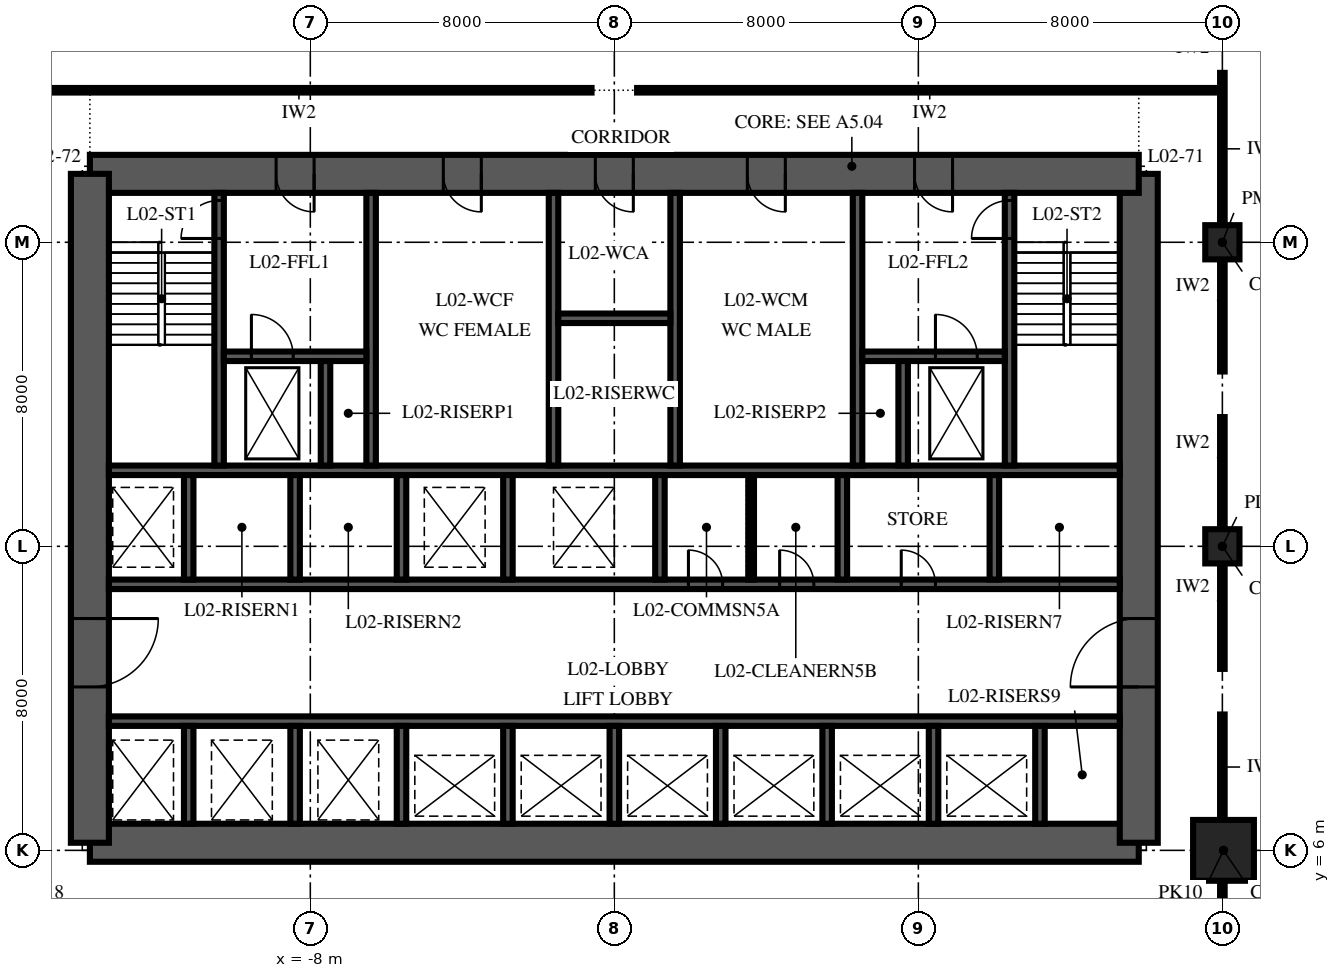
"""IFC4 building model, lengths in metres.
Left out: names, types, materials, properties, quantities, classifications, styles, units other than length and angle.
Written with IfcOpenShell. Run it as: python <this file> out.ifc"""

import sys

from ifc_helpers import new_model, si_unit, direction, frame, frame_2d, origin, origin_2d, place, context, subcontext, project, spatial, polyline, rectangle, outline, extrude, element, fill, save


model = new_model("IFC4")
c1 = context("Model", 3, precision=1e-05, world=origin(), true_north=direction((0.0, 1.0)))
c2 = subcontext(c1, "Body", "Model", "MODEL_VIEW")
j1 = project(units=[si_unit("LENGTHUNIT", "METRE"), si_unit("PLANEANGLEUNIT", "RADIAN")], contexts=[c1])
p1 = place(None, origin())
s1 = spatial("IfcSite", under=j1, at=p1, CompositionType="ELEMENT")
p2 = place(p1, origin())
s2 = spatial("IfcBuilding", under=s1, at=p2, CompositionType="ELEMENT")
p3 = place(p2, frame((0.0, 0.0, 12.0)))
s3 = spatial("IfcBuildingStorey", under=s2, at=p3, CompositionType="ELEMENT", Elevation=12.0)
p4 = place(p3, frame((16.03, 6.0, 0.0), z_axis=(0.0, 0.0, 1.0), x_axis=(1.0, 0.0, 0.0)))
e1 = element("IfcColumn", 1, at=p4, inside=s3, PredefinedType="COLUMN", context=c2, shape_type="SweptSolid", body=[
    extrude(rectangle(XDim=1.6, YDim=1.6, at=origin_2d()), origin(), (0.0, 0.0, 1.0), 7.0),
])
for number, where, z_axis, x_axis in (
    (2, (16.0, 14.0, 0.0), (0.0, 0.0, 1.0), (1.0, 0.0, 0.0)),
    (3, (16.0, 22.0, 0.0), (0.0, 0.0, 1.0), (1.0, 0.0, 0.0)),
):
    element("IfcColumn", number, at=place(p3, frame(where, z_axis=z_axis, x_axis=x_axis)), inside=s3, PredefinedType="COLUMN", context=c2, shape_type="SweptSolid", body=[
        extrude(rectangle(XDim=0.9, YDim=0.9, at=origin_2d()), origin(), (0.0, 0.0, 1.0), 7.0),
    ])
p5 = place(p3, frame((-13.8, 6.2, 0.0), z_axis=(0.0, 0.0, 1.0), x_axis=(1.0, 0.0, 0.0)))
e4 = element("IfcWall", 4, at=p5, inside=s3, PredefinedType="SHEAR", context=c2, shape_type="SweptSolid", body=[
    extrude(rectangle(XDim=27.6, YDim=1.0, at=frame_2d((13.8, 0.0))), origin(), (0.0, 0.0, 1.0), 7.0),
])
p6 = place(p3, frame((13.8, 6.2, 0.0), z_axis=(0.0, 0.0, 1.0), x_axis=(0.0, 1.0, 0.0)))
e5 = element("IfcWall", 5, at=p6, inside=s3, PredefinedType="SHEAR", context=c2, shape_type="SweptSolid", body=[
    extrude(outline(polyline([(0.0, -0.5), (17.6, -0.5), (17.6, 0.0), (17.1, 0.0), (17.1, 0.5), (0.5, 0.5), (0.5, 0.0), (0.0, 0.0), (0.0, -0.5)])), origin(), (0.0, 0.0, 1.0), 7.0),
])
p7 = place(p6, frame((4.1, 0.0, 0.0)))
e6 = element("IfcOpeningElement", 6, at=p7, cuts=e5, PredefinedType="OPENING", context=c2, shape_type="SweptSolid", body=[
    extrude(rectangle(XDim=1.8, YDim=2.4, at=frame_2d((0.9, 1.2))), frame((0.0, 0.515, 0.0), z_axis=(0.0, -1.0, 0.0), x_axis=(1.0, 0.0, 0.0)), (0.0, 0.0, 1.0), 1.03),
])
p8 = place(p3, frame((13.8, 23.8, 0.0), z_axis=(0.0, 0.0, 1.0), x_axis=(-1.0, 0.0, 0.0)))
e7 = element("IfcWall", 7, at=p8, inside=s3, PredefinedType="SHEAR", context=c2, shape_type="SweptSolid", body=[
    extrude(rectangle(XDim=27.6, YDim=1.0, at=frame_2d((13.8, 0.0))), origin(), (0.0, 0.0, 1.0), 7.0),
])
p9 = place(p8, frame((21.7, 0.0, 0.0)))
e8 = element("IfcOpeningElement", 8, at=p9, cuts=e7, PredefinedType="OPENING", context=c2, shape_type="SweptSolid", body=[
    extrude(rectangle(XDim=1.0, YDim=2.1, at=frame_2d((0.5, 1.05))), frame((0.0, 0.515, 0.0), z_axis=(0.0, -1.0, 0.0), x_axis=(1.0, 0.0, 0.0)), (0.0, 0.0, 1.0), 1.03),
])
p10 = place(p8, frame((4.9, 0.0, 0.0)))
e9 = element("IfcOpeningElement", 9, at=p10, cuts=e7, PredefinedType="OPENING", context=c2, shape_type="SweptSolid", body=[
    extrude(rectangle(XDim=1.0, YDim=2.1, at=frame_2d((0.5, 1.05))), frame((0.0, 0.515, 0.0), z_axis=(0.0, -1.0, 0.0), x_axis=(1.0, 0.0, 0.0)), (0.0, 0.0, 1.0), 1.03),
])
p11 = place(p8, frame((17.3, 0.0, 0.0)))
e10 = element("IfcOpeningElement", 10, at=p11, cuts=e7, PredefinedType="OPENING", context=c2, shape_type="SweptSolid", body=[
    extrude(rectangle(XDim=1.0, YDim=2.1, at=frame_2d((0.5, 1.05))), frame((0.0, 0.515, 0.0), z_axis=(0.0, -1.0, 0.0), x_axis=(1.0, 0.0, 0.0)), (0.0, 0.0, 1.0), 1.03),
])
p12 = place(p8, frame((13.3, 0.0, 0.0)))
e11 = element("IfcOpeningElement", 11, at=p12, cuts=e7, PredefinedType="OPENING", context=c2, shape_type="SweptSolid", body=[
    extrude(rectangle(XDim=1.0, YDim=2.1, at=frame_2d((0.5, 1.05))), frame((0.0, 0.515, 0.0), z_axis=(0.0, -1.0, 0.0), x_axis=(1.0, 0.0, 0.0)), (0.0, 0.0, 1.0), 1.03),
])
p13 = place(p8, frame((9.3, 0.0, 0.0)))
e12 = element("IfcOpeningElement", 12, at=p13, cuts=e7, PredefinedType="OPENING", context=c2, shape_type="SweptSolid", body=[
    extrude(rectangle(XDim=1.0, YDim=2.1, at=frame_2d((0.5, 1.05))), frame((0.0, 0.515, 0.0), z_axis=(0.0, -1.0, 0.0), x_axis=(1.0, 0.0, 0.0)), (0.0, 0.0, 1.0), 1.03),
])
p14 = place(p3, frame((-13.8, 23.8, 0.0), z_axis=(0.0, 0.0, 1.0), x_axis=(0.0, -1.0, 0.0)))
e13 = element("IfcWall", 13, at=p14, inside=s3, PredefinedType="SHEAR", context=c2, shape_type="SweptSolid", body=[
    extrude(outline(polyline([(0.0, -0.5), (17.6, -0.5), (17.6, 0.0), (17.1, 0.0), (17.1, 0.5), (0.5, 0.5), (0.5, 0.0), (0.0, 0.0), (0.0, -0.5)])), origin(), (0.0, 0.0, 1.0), 7.0),
])
p15 = place(p14, frame((11.7, 0.0, 0.0)))
e14 = element("IfcOpeningElement", 14, at=p15, cuts=e13, PredefinedType="OPENING", context=c2, shape_type="SweptSolid", body=[
    extrude(rectangle(XDim=1.8, YDim=2.4, at=frame_2d((0.9, 1.2))), frame((0.0, 0.515, 0.0), z_axis=(0.0, -1.0, 0.0), x_axis=(1.0, 0.0, 0.0)), (0.0, 0.0, 1.0), 1.03),
])
p16 = place(p3, frame((-13.3, 9.4, 0.0), z_axis=(0.0, 0.0, 1.0), x_axis=(1.0, 0.0, 0.0)))
e15 = element("IfcWall", 15, at=p16, inside=s3, PredefinedType="SHEAR", context=c2, shape_type="SweptSolid", body=[
    extrude(rectangle(XDim=26.6, YDim=0.25, at=frame_2d((13.3, 0.0))), origin(), (0.0, 0.0, 1.0), 7.0),
])
p17 = place(p3, frame((-13.3, 13.0, 0.0), z_axis=(0.0, 0.0, 1.0), x_axis=(1.0, 0.0, 0.0)))
e16 = element("IfcWall", 16, at=p17, inside=s3, PredefinedType="SHEAR", context=c2, shape_type="SweptSolid", body=[
    extrude(rectangle(XDim=26.6, YDim=0.25, at=frame_2d((13.3, 0.0))), origin(), (0.0, 0.0, 1.0), 7.0),
])
p18 = place(p17, frame((15.25, 0.0, 0.0)))
e17 = element("IfcOpeningElement", 17, at=p18, cuts=e16, PredefinedType="OPENING", context=c2, shape_type="SweptSolid", body=[
    extrude(rectangle(XDim=0.9, YDim=2.1, at=frame_2d((0.45, 1.05))), frame((0.0, 0.14, 0.0), z_axis=(0.0, -1.0, 0.0), x_axis=(1.0, 0.0, 0.0)), (0.0, 0.0, 1.0), 0.28),
])
p19 = place(p17, frame((17.65, 0.0, 0.0)))
e18 = element("IfcOpeningElement", 18, at=p19, cuts=e16, PredefinedType="OPENING", context=c2, shape_type="SweptSolid", body=[
    extrude(rectangle(XDim=0.9, YDim=2.1, at=frame_2d((0.45, 1.05))), frame((0.0, 0.14, 0.0), z_axis=(0.0, -1.0, 0.0), x_axis=(1.0, 0.0, 0.0)), (0.0, 0.0, 1.0), 0.28),
])
p20 = place(p17, frame((20.85, 0.0, 0.0)))
e19 = element("IfcOpeningElement", 19, at=p20, cuts=e16, PredefinedType="OPENING", context=c2, shape_type="SweptSolid", body=[
    extrude(rectangle(XDim=0.9, YDim=2.1, at=frame_2d((0.45, 1.05))), frame((0.0, 0.14, 0.0), z_axis=(0.0, -1.0, 0.0), x_axis=(1.0, 0.0, 0.0)), (0.0, 0.0, 1.0), 0.28),
])
p21 = place(p3, frame((-13.3, 16.0, 0.0), z_axis=(0.0, 0.0, 1.0), x_axis=(1.0, 0.0, 0.0)))
e20 = element("IfcWall", 20, at=p21, inside=s3, PredefinedType="SHEAR", context=c2, shape_type="SweptSolid", body=[
    extrude(rectangle(XDim=26.6, YDim=0.25, at=frame_2d((13.3, 0.0))), origin(), (0.0, 0.0, 1.0), 7.0),
])
for number, where, z_axis, x_axis in (
    (21, (-11.2, 6.7, 0.0), (0.0, 0.0, 1.0), (0.0, 1.0, 0.0)),
    (22, (-8.4, 6.7, 0.0), (0.0, 0.0, 1.0), (0.0, 1.0, 0.0)),
    (23, (-5.6, 6.7, 0.0), (0.0, 0.0, 1.0), (0.0, 1.0, 0.0)),
    (24, (-2.8, 6.7, 0.0), (0.0, 0.0, 1.0), (0.0, 1.0, 0.0)),
    (25, (0.0, 6.7, 0.0), (0.0, 0.0, 1.0), (0.0, 1.0, 0.0)),
    (26, (2.8, 6.7, 0.0), (0.0, 0.0, 1.0), (0.0, 1.0, 0.0)),
    (27, (5.6, 6.7, 0.0), (0.0, 0.0, 1.0), (0.0, 1.0, 0.0)),
    (28, (8.4, 6.7, 0.0), (0.0, 0.0, 1.0), (0.0, 1.0, 0.0)),
    (29, (11.2, 6.7, 0.0), (0.0, 0.0, 1.0), (0.0, 1.0, 0.0)),
):
    element("IfcWall", number, at=place(p3, frame(where, z_axis=z_axis, x_axis=x_axis)), inside=s3, PredefinedType="SHEAR", context=c2, shape_type="SweptSolid", body=[
        extrude(rectangle(XDim=2.575, YDim=0.25, at=frame_2d((1.288, 0.0))), origin(), (0.0, 0.0, 1.0), 7.0),
    ])
for number, where, z_axis, x_axis in (
    (30, (-11.2, 13.125, 0.0), (0.0, 0.0, 1.0), (0.0, 1.0, 0.0)),
    (31, (-8.4, 13.125, 0.0), (0.0, 0.0, 1.0), (0.0, 1.0, 0.0)),
    (32, (-5.6, 13.125, 0.0), (0.0, 0.0, 1.0), (0.0, 1.0, 0.0)),
    (33, (-2.8, 13.125, 0.0), (0.0, 0.0, 1.0), (0.0, 1.0, 0.0)),
    (34, (1.2, 13.125, 0.0), (0.0, 0.0, 1.0), (0.0, 1.0, 0.0)),
    (35, (6.0, 13.125, 0.0), (0.0, 0.0, 1.0), (0.0, 1.0, 0.0)),
    (36, (10.0, 13.125, 0.0), (0.0, 0.0, 1.0), (0.0, 1.0, 0.0)),
):
    element("IfcWall", number, at=place(p3, frame(where, z_axis=z_axis, x_axis=x_axis)), inside=s3, PredefinedType="SHEAR", context=c2, shape_type="SweptSolid", body=[
        extrude(rectangle(XDim=2.75, YDim=0.25, at=frame_2d((1.375, 0.0))), origin(), (0.0, 0.0, 1.0), 7.0),
    ])
p22 = place(p3, frame((-10.4, 16.125, 0.0), z_axis=(0.0, 0.0, 1.0), x_axis=(0.0, 1.0, 0.0)))
e37 = element("IfcWall", 37, at=p22, inside=s3, PredefinedType="SHEAR", context=c2, shape_type="SweptSolid", body=[
    extrude(rectangle(XDim=7.175, YDim=0.25, at=frame_2d((3.587, 0.0))), origin(), (0.0, 0.0, 1.0), 7.0),
])
p23 = place(p22, frame((5.975, 0.0, 0.0)))
e38 = element("IfcOpeningElement", 38, at=p23, cuts=e37, PredefinedType="OPENING", context=c2, shape_type="SweptSolid", body=[
    extrude(rectangle(XDim=1.0, YDim=2.1, at=frame_2d((0.5, 1.05))), frame((0.0, 0.14, 0.0), z_axis=(0.0, -1.0, 0.0), x_axis=(1.0, 0.0, 0.0)), (0.0, 0.0, 1.0), 0.28),
])
for number, where, z_axis, x_axis in (
    (39, (-6.4, 16.125, 0.0), (0.0, 0.0, 1.0), (0.0, 1.0, 0.0)),
    (40, (-1.6, 16.125, 0.0), (0.0, 0.0, 1.0), (0.0, 1.0, 0.0)),
    (41, (1.6, 16.125, 0.0), (0.0, 0.0, 1.0), (0.0, 1.0, 0.0)),
    (42, (6.4, 16.125, 0.0), (0.0, 0.0, 1.0), (0.0, 1.0, 0.0)),
):
    element("IfcWall", number, at=place(p3, frame(where, z_axis=z_axis, x_axis=x_axis)), inside=s3, PredefinedType="SHEAR", context=c2, shape_type="SweptSolid", body=[
        extrude(rectangle(XDim=7.175, YDim=0.25, at=frame_2d((3.587, 0.0))), origin(), (0.0, 0.0, 1.0), 7.0),
    ])
p24 = place(p3, frame((10.4, 16.125, 0.0), z_axis=(0.0, 0.0, 1.0), x_axis=(0.0, 1.0, 0.0)))
e43 = element("IfcWall", 43, at=p24, inside=s3, PredefinedType="SHEAR", context=c2, shape_type="SweptSolid", body=[
    extrude(rectangle(XDim=7.175, YDim=0.25, at=frame_2d((3.587, 0.0))), origin(), (0.0, 0.0, 1.0), 7.0),
])
p25 = place(p24, frame((5.975, 0.0, 0.0)))
e44 = element("IfcOpeningElement", 44, at=p25, cuts=e43, PredefinedType="OPENING", context=c2, shape_type="SweptSolid", body=[
    extrude(rectangle(XDim=1.0, YDim=2.1, at=frame_2d((0.5, 1.05))), frame((0.0, 0.14, 0.0), z_axis=(0.0, -1.0, 0.0), x_axis=(1.0, 0.0, 0.0)), (0.0, 0.0, 1.0), 0.28),
])
p26 = place(p3, frame((-10.275, 19.0, 0.0), z_axis=(0.0, 0.0, 1.0), x_axis=(1.0, 0.0, 0.0)))
e45 = element("IfcWall", 45, at=p26, inside=s3, PredefinedType="SHEAR", context=c2, shape_type="SweptSolid", body=[
    extrude(rectangle(XDim=3.75, YDim=0.25, at=frame_2d((1.875, 0.0))), origin(), (0.0, 0.0, 1.0), 7.0),
])
p27 = place(p26, frame((0.725, 0.0, 0.0)))
e46 = element("IfcOpeningElement", 46, at=p27, cuts=e45, PredefinedType="OPENING", context=c2, shape_type="SweptSolid", body=[
    extrude(rectangle(XDim=1.1, YDim=2.1, at=frame_2d((0.55, 1.05))), frame((0.0, 0.14, 0.0), z_axis=(0.0, -1.0, 0.0), x_axis=(1.0, 0.0, 0.0)), (0.0, 0.0, 1.0), 0.28),
])
p28 = place(p3, frame((6.525, 19.0, 0.0), z_axis=(0.0, 0.0, 1.0), x_axis=(1.0, 0.0, 0.0)))
e47 = element("IfcWall", 47, at=p28, inside=s3, PredefinedType="SHEAR", context=c2, shape_type="SweptSolid", body=[
    extrude(rectangle(XDim=3.75, YDim=0.25, at=frame_2d((1.875, 0.0))), origin(), (0.0, 0.0, 1.0), 7.0),
])
p29 = place(p28, frame((1.925, 0.0, 0.0)))
e48 = element("IfcOpeningElement", 48, at=p29, cuts=e47, PredefinedType="OPENING", context=c2, shape_type="SweptSolid", body=[
    extrude(rectangle(XDim=1.1, YDim=2.1, at=frame_2d((0.55, 1.05))), frame((0.0, 0.14, 0.0), z_axis=(0.0, -1.0, 0.0), x_axis=(1.0, 0.0, 0.0)), (0.0, 0.0, 1.0), 0.28),
])
for number, where, z_axis, x_axis in (
    (49, (-7.6, 16.125, 0.0), (0.0, 0.0, 1.0), (0.0, 1.0, 0.0)),
    (50, (7.6, 16.125, 0.0), (0.0, 0.0, 1.0), (0.0, 1.0, 0.0)),
):
    element("IfcWall", number, at=place(p3, frame(where, z_axis=z_axis, x_axis=x_axis)), inside=s3, PredefinedType="SHEAR", context=c2, shape_type="SweptSolid", body=[
        extrude(rectangle(XDim=2.75, YDim=0.25, at=frame_2d((1.375, 0.0))), origin(), (0.0, 0.0, 1.0), 7.0),
    ])
p30 = place(p3, frame((-1.475, 20.0, 0.0), z_axis=(0.0, 0.0, 1.0), x_axis=(1.0, 0.0, 0.0)))
e51 = element("IfcWall", 51, at=p30, inside=s3, PredefinedType="SHEAR", context=c2, shape_type="SweptSolid", body=[
    extrude(rectangle(XDim=2.95, YDim=0.25, at=frame_2d((1.475, 0.0))), origin(), (0.0, 0.0, 1.0), 7.0),
])
p31 = place(p3, frame((3.6, 13.125, 0.0), z_axis=(0.0, 0.0, 1.0), x_axis=(0.0, 1.0, 0.0)))
e52 = element("IfcWall", 52, at=p31, inside=s3, PredefinedType="PARTITIONING", context=c2, shape_type="SweptSolid", body=[
    extrude(rectangle(XDim=2.75, YDim=0.15, at=frame_2d((1.375, 0.0))), origin(), (0.0, 0.0, 1.0), 6.85),
])
for number, where, z_axis, x_axis in (
    (53, (16.0, 2.425, 0.0), (0.0, 0.0, 1.0), (0.0, 1.0, 0.0)),
    (54, (16.0, 6.81, 0.0), (0.0, 0.0, 1.0), (0.0, 1.0, 0.0)),
):
    element("IfcWall", number, at=place(p3, frame(where, z_axis=z_axis, x_axis=x_axis)), inside=s3, PredefinedType="PARTITIONING", context=c2, shape_type="SweptSolid", body=[
        extrude(rectangle(XDim=2.765, YDim=0.12, at=frame_2d((1.382, 0.0))), origin(), (0.0, 0.0, 1.0), 6.05),
    ])
p32 = place(p3, frame((16.0, 10.775, 0.0), z_axis=(0.0, 0.0, 1.0), x_axis=(0.0, 1.0, 0.0)))
e55 = element("IfcWall", 55, at=p32, inside=s3, PredefinedType="PARTITIONING", context=c2, shape_type="SweptSolid", body=[
    extrude(rectangle(XDim=2.765, YDim=0.12, at=frame_2d((1.383, 0.0))), origin(), (0.0, 0.0, 1.0), 6.05),
])
for number, where, z_axis, x_axis in (
    (56, (16.0, 14.46, 0.0), (0.0, 0.0, 1.0), (0.0, 1.0, 0.0)),
    (57, (16.0, 18.6, 0.0), (0.0, 0.0, 1.0), (0.0, 1.0, 0.0)),
):
    element("IfcWall", number, at=place(p3, frame(where, z_axis=z_axis, x_axis=x_axis)), inside=s3, PredefinedType="PARTITIONING", context=c2, shape_type="SweptSolid", body=[
        extrude(rectangle(XDim=2.94, YDim=0.12, at=frame_2d((1.47, 0.0))), origin(), (0.0, 0.0, 1.0), 6.05),
    ])
p33 = place(p3, frame((16.0, 22.46, 0.0), z_axis=(0.0, 0.0, 1.0), x_axis=(0.0, 1.0, 0.0)))
e58 = element("IfcWall", 58, at=p33, inside=s3, PredefinedType="PARTITIONING", context=c2, shape_type="SweptSolid", body=[
    extrude(rectangle(XDim=3.998, YDim=0.12, at=frame_2d((1.999, 0.0))), origin(), (0.0, 0.0, 1.0), 6.7),
])
for number, where, z_axis, x_axis in (
    (59, (-16.0, 26.0, 0.0), (0.0, 0.0, 1.0), (1.0, 0.0, 0.0)),
    (60, (0.6, 26.0, 0.0), (0.0, 0.0, 1.0), (1.0, 0.0, 0.0)),
):
    element("IfcWall", number, at=place(p3, frame(where, z_axis=z_axis, x_axis=x_axis)), inside=s3, PredefinedType="PARTITIONING", context=c2, shape_type="SweptSolid", body=[
        extrude(rectangle(XDim=15.4, YDim=0.12, at=frame_2d((7.7, 0.0))), origin(), (0.0, 0.0, 1.0), 6.7),
    ])
p34 = place(p7, origin())
e61 = element("IfcDoor", 61, at=p34, inside=s3, OperationType="DOUBLE_DOOR_SINGLE_SWING", PredefinedType="DOOR", context=c2, shape_type="SweptSolid", body=[
    extrude(rectangle(XDim=1.8, YDim=2.4, at=frame_2d((0.9, 1.2))), frame((0.0, 0.5, 0.0), z_axis=(0.0, -1.0, 0.0), x_axis=(1.0, 0.0, 0.0)), (0.0, 0.0, 1.0), 1.0),
])
fill(e6, e61)
p35 = place(p15, origin())
e62 = element("IfcDoor", 62, at=p35, inside=s3, OperationType="DOUBLE_DOOR_SINGLE_SWING", PredefinedType="DOOR", context=c2, shape_type="SweptSolid", body=[
    extrude(rectangle(XDim=1.8, YDim=2.4, at=frame_2d((0.9, 1.2))), frame((0.0, 0.5, 0.0), z_axis=(0.0, -1.0, 0.0), x_axis=(1.0, 0.0, 0.0)), (0.0, 0.0, 1.0), 1.0),
])
fill(e14, e62)
p36 = place(p9, origin())
e63 = element("IfcDoor", 63, at=p36, inside=s3, OperationType="SINGLE_SWING_RIGHT", PredefinedType="DOOR", context=c2, shape_type="SweptSolid", body=[
    extrude(rectangle(XDim=1.0, YDim=2.1, at=frame_2d((0.5, 1.05))), frame((0.0, 0.5, 0.0), z_axis=(0.0, -1.0, 0.0), x_axis=(1.0, 0.0, 0.0)), (0.0, 0.0, 1.0), 1.0),
])
fill(e8, e63)
p37 = place(p10, origin())
e64 = element("IfcDoor", 64, at=p37, inside=s3, OperationType="SINGLE_SWING_RIGHT", PredefinedType="DOOR", context=c2, shape_type="SweptSolid", body=[
    extrude(rectangle(XDim=1.0, YDim=2.1, at=frame_2d((0.5, 1.05))), frame((0.0, 0.5, 0.0), z_axis=(0.0, -1.0, 0.0), x_axis=(1.0, 0.0, 0.0)), (0.0, 0.0, 1.0), 1.0),
])
fill(e9, e64)
p38 = place(p11, origin())
e65 = element("IfcDoor", 65, at=p38, inside=s3, OperationType="SINGLE_SWING_LEFT", PredefinedType="DOOR", context=c2, shape_type="SweptSolid", body=[
    extrude(rectangle(XDim=1.0, YDim=2.1, at=frame_2d((0.5, 1.05))), frame((0.0, 0.5, 0.0), z_axis=(0.0, -1.0, 0.0), x_axis=(1.0, 0.0, 0.0)), (0.0, 0.0, 1.0), 1.0),
])
fill(e10, e65)
p39 = place(p12, origin())
e66 = element("IfcDoor", 66, at=p39, inside=s3, OperationType="SINGLE_SWING_LEFT", PredefinedType="DOOR", context=c2, shape_type="SweptSolid", body=[
    extrude(rectangle(XDim=1.0, YDim=2.1, at=frame_2d((0.5, 1.05))), frame((0.0, 0.5, 0.0), z_axis=(0.0, -1.0, 0.0), x_axis=(1.0, 0.0, 0.0)), (0.0, 0.0, 1.0), 1.0),
])
fill(e11, e66)
p40 = place(p13, origin())
e67 = element("IfcDoor", 67, at=p40, inside=s3, OperationType="SINGLE_SWING_LEFT", PredefinedType="DOOR", context=c2, shape_type="SweptSolid", body=[
    extrude(rectangle(XDim=1.0, YDim=2.1, at=frame_2d((0.5, 1.05))), frame((0.0, 0.5, 0.0), z_axis=(0.0, -1.0, 0.0), x_axis=(1.0, 0.0, 0.0)), (0.0, 0.0, 1.0), 1.0),
])
fill(e12, e67)
p41 = place(p23, origin())
e68 = element("IfcDoor", 68, at=p41, inside=s3, OperationType="SINGLE_SWING_LEFT", PredefinedType="DOOR", context=c2, shape_type="SweptSolid", body=[
    extrude(rectangle(XDim=1.0, YDim=2.1, at=frame_2d((0.5, 1.05))), frame((0.0, 0.125, 0.0), z_axis=(0.0, -1.0, 0.0), x_axis=(1.0, 0.0, 0.0)), (0.0, 0.0, 1.0), 0.25),
])
fill(e38, e68)
p42 = place(p25, origin())
e69 = element("IfcDoor", 69, at=p42, inside=s3, OperationType="SINGLE_SWING_LEFT", PredefinedType="DOOR", context=c2, shape_type="SweptSolid", body=[
    extrude(rectangle(XDim=1.0, YDim=2.1, at=frame_2d((0.5, 1.05))), frame((0.0, 0.125, 0.0), z_axis=(0.0, -1.0, 0.0), x_axis=(1.0, 0.0, 0.0)), (0.0, 0.0, 1.0), 0.25),
])
fill(e44, e69)
p43 = place(p29, origin())
e70 = element("IfcDoor", 70, at=p43, inside=s3, OperationType="SLIDING_TO_RIGHT", PredefinedType="DOOR", context=c2, shape_type="SweptSolid", body=[
    extrude(rectangle(XDim=1.1, YDim=2.1, at=frame_2d((0.55, 1.05))), frame((0.0, 0.125, 0.0), z_axis=(0.0, -1.0, 0.0), x_axis=(1.0, 0.0, 0.0)), (0.0, 0.0, 1.0), 0.25),
])
fill(e48, e70)
p44 = place(p27, origin())
e71 = element("IfcDoor", 71, at=p44, inside=s3, OperationType="SLIDING_TO_RIGHT", PredefinedType="DOOR", context=c2, shape_type="SweptSolid", body=[
    extrude(rectangle(XDim=1.1, YDim=2.1, at=frame_2d((0.55, 1.05))), frame((0.0, 0.125, 0.0), z_axis=(0.0, -1.0, 0.0), x_axis=(1.0, 0.0, 0.0)), (0.0, 0.0, 1.0), 0.25),
])
fill(e46, e71)
p45 = place(p18, origin())
e72 = element("IfcDoor", 72, at=p45, inside=s3, OperationType="SINGLE_SWING_LEFT", PredefinedType="DOOR", context=c2, shape_type="SweptSolid", body=[
    extrude(rectangle(XDim=0.9, YDim=2.1, at=frame_2d((0.45, 1.05))), frame((0.0, 0.125, 0.0), z_axis=(0.0, -1.0, 0.0), x_axis=(1.0, 0.0, 0.0)), (0.0, 0.0, 1.0), 0.25),
])
fill(e17, e72)
p46 = place(p19, origin())
e73 = element("IfcDoor", 73, at=p46, inside=s3, OperationType="SINGLE_SWING_LEFT", PredefinedType="DOOR", context=c2, shape_type="SweptSolid", body=[
    extrude(rectangle(XDim=0.9, YDim=2.1, at=frame_2d((0.45, 1.05))), frame((0.0, 0.125, 0.0), z_axis=(0.0, -1.0, 0.0), x_axis=(1.0, 0.0, 0.0)), (0.0, 0.0, 1.0), 0.25),
])
fill(e18, e73)
p47 = place(p20, origin())
e74 = element("IfcDoor", 74, at=p47, inside=s3, OperationType="SINGLE_SWING_LEFT", PredefinedType="DOOR", context=c2, shape_type="SweptSolid", body=[
    extrude(rectangle(XDim=0.9, YDim=2.1, at=frame_2d((0.45, 1.05))), frame((0.0, 0.125, 0.0), z_axis=(0.0, -1.0, 0.0), x_axis=(1.0, 0.0, 0.0)), (0.0, 0.0, 1.0), 0.25),
])
fill(e19, e74)
save(model, sys.argv[1])
